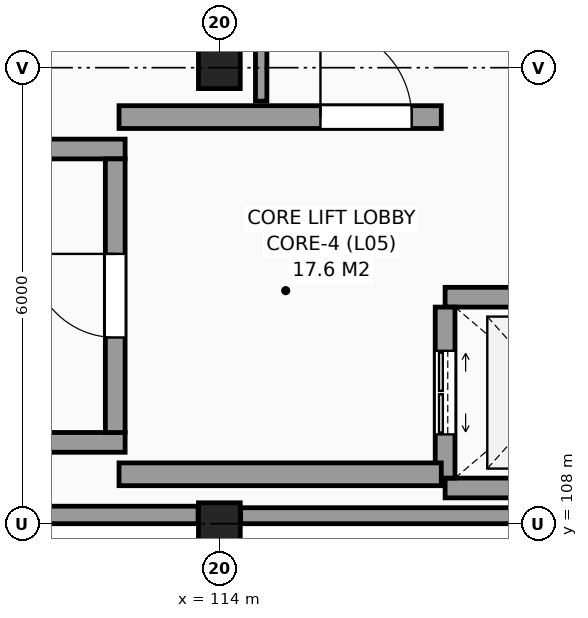
"""IFC4 building model, lengths in metres.
Left out: names, types, materials, properties, quantities, classifications, styles, units other than length and angle.
Written with IfcOpenShell. Run it as: python <this file> out.ifc"""

import sys

from ifc_helpers import new_model, si_unit, direction, frame, frame_2d, origin, origin_2d, place, context, subcontext, project, spatial, rectangle, extrude, element, fill, save


model = new_model("IFC4")
c1 = context("Model", 3, precision=1e-05, world=origin(), true_north=direction((0.0, 1.0)))
c2 = subcontext(c1, "Body", "Model", "MODEL_VIEW")
j1 = project(units=[si_unit("LENGTHUNIT", "METRE"), si_unit("PLANEANGLEUNIT", "RADIAN")], contexts=[c1])
p1 = place(None, origin())
s1 = spatial("IfcSite", under=j1, at=p1, CompositionType="ELEMENT")
p2 = place(p1, origin())
s2 = spatial("IfcBuilding", under=s1, at=p2, CompositionType="ELEMENT")
p3 = place(p2, frame((0.0, 0.0, 24.6)))
s3 = spatial("IfcBuildingStorey", under=s2, at=p3, CompositionType="ELEMENT", Elevation=24.6)
for number, where, z_axis, x_axis in (
    (1, (114.0, 108.0, 0.0), (0.0, 0.0, 1.0), (1.0, 0.0, 0.0)),
    (2, (114.0, 114.0, 0.0), (0.0, 0.0, 1.0), (1.0, 0.0, 0.0)),
):
    element("IfcColumn", number, at=place(p3, frame(where, z_axis=z_axis, x_axis=x_axis)), inside=s3, PredefinedType="COLUMN", context=c2, shape_type="SweptSolid", body=[
        extrude(rectangle(XDim=0.55, YDim=0.55, at=origin_2d()), origin(), (0.0, 0.0, 1.0), 3.6),
    ])
p4 = place(p3, frame((108.305, 108.115, 0.0), z_axis=(0.0, 0.0, 1.0), x_axis=(1.0, 0.0, 0.0)))
e3 = element("IfcWall", 3, at=p4, inside=s3, PredefinedType="SOLIDWALL", context=c2, shape_type="SweptSolid", body=[
    extrude(rectangle(XDim=5.415, YDim=0.23, at=frame_2d((2.708, 0.0))), origin(), (0.0, 0.0, 1.0), 2.73),
])
p5 = place(p3, frame((114.28, 108.105, 0.0), z_axis=(0.0, 0.0, 1.0), x_axis=(1.0, 0.0, 0.0)))
e4 = element("IfcWall", 4, at=p5, inside=s3, PredefinedType="SOLIDWALL", context=c2, shape_type="SweptSolid", body=[
    extrude(rectangle(XDim=5.415, YDim=0.21, at=frame_2d((2.708, 0.0))), origin(), (0.0, 0.0, 1.0), 2.73),
])
for number, where, z_axis, x_axis in (
    (5, (102.04, 109.07, 0.0), (0.0, 0.0, 1.0), (1.0, 0.0, 0.0)),
    (6, (102.04, 112.93, 0.0), (0.0, 0.0, 1.0), (1.0, 0.0, 0.0)),
):
    element("IfcWall", number, at=place(p3, frame(where, z_axis=z_axis, x_axis=x_axis)), inside=s3, PredefinedType="SHEAR", context=c2, shape_type="SweptSolid", body=[
        extrude(rectangle(XDim=10.72, YDim=0.26, at=frame_2d((5.36, 0.0))), origin(), (0.0, 0.0, 1.0), 3.6),
    ])
p6 = place(p3, frame((112.63, 109.2, 0.0), z_axis=(0.0, 0.0, 1.0), x_axis=(0.0, 1.0, 0.0)))
e7 = element("IfcWall", 7, at=p6, inside=s3, PredefinedType="SHEAR", context=c2, shape_type="SweptSolid", body=[
    extrude(rectangle(XDim=3.6, YDim=0.26, at=frame_2d((1.8, 0.0))), origin(), (0.0, 0.0, 1.0), 3.6),
])
p7 = place(p6, frame((1.25, 0.0, 0.0)))
e8 = element("IfcOpeningElement", 8, at=p7, cuts=e7, PredefinedType="OPENING", context=c2, shape_type="SweptSolid", body=[
    extrude(rectangle(XDim=1.1, YDim=2.15, at=frame_2d((0.55, 1.075))), frame((0.0, 0.14, 0.0), z_axis=(0.0, -1.0, 0.0), x_axis=(1.0, 0.0, 0.0)), (0.0, 0.0, 1.0), 0.28),
])
for number, where, z_axis, x_axis in (
    (9, (116.97, 108.47, 0.0), (0.0, 0.0, 1.0), (1.0, 0.0, 0.0)),
    (10, (116.97, 110.98, 0.0), (0.0, 0.0, 1.0), (1.0, 0.0, 0.0)),
):
    element("IfcWall", number, at=place(p3, frame(where, z_axis=z_axis, x_axis=x_axis)), inside=s3, PredefinedType="SHEAR", context=c2, shape_type="SweptSolid", body=[
        extrude(rectangle(XDim=2.91, YDim=0.26, at=frame_2d((1.455, 0.0))), origin(), (0.0, 0.0, 1.0), 3.6),
    ])
p8 = place(p3, frame((116.97, 108.6, 0.0), z_axis=(0.0, 0.0, 1.0), x_axis=(0.0, 1.0, 0.0)))
e11 = element("IfcWall", 11, at=p8, inside=s3, PredefinedType="SHEAR", context=c2, shape_type="SweptSolid", body=[
    extrude(rectangle(XDim=2.25, YDim=0.26, at=frame_2d((1.125, 0.0))), origin(), (0.0, 0.0, 1.0), 3.6),
])
p9 = place(p8, frame((0.575, 0.0, 0.0)))
e12 = element("IfcOpeningElement", 12, at=p9, cuts=e11, PredefinedType="OPENING", context=c2, shape_type="SweptSolid", body=[
    extrude(rectangle(XDim=1.1, YDim=2.2, at=frame_2d((0.55, 1.1))), frame((0.0, 0.14, 0.0), z_axis=(0.0, -1.0, 0.0), x_axis=(1.0, 0.0, 0.0)), (0.0, 0.0, 1.0), 0.28),
])
p10 = place(p3, frame((112.68, 113.35, 0.0), z_axis=(0.0, 0.0, 1.0), x_axis=(1.0, 0.0, 0.0)))
e13 = element("IfcWall", 13, at=p10, inside=s3, PredefinedType="SHEAR", context=c2, shape_type="SweptSolid", body=[
    extrude(rectangle(XDim=4.24, YDim=0.3, at=frame_2d((2.12, 0.0))), origin(), (0.0, 0.0, 1.0), 3.6),
])
p11 = place(p10, frame((2.65, 0.0, 0.0)))
e14 = element("IfcOpeningElement", 14, at=p11, cuts=e13, PredefinedType="OPENING", context=c2, shape_type="SweptSolid", body=[
    extrude(rectangle(XDim=1.2, YDim=2.2, at=frame_2d((0.6, 1.1))), frame((0.0, 0.16, 0.0), z_axis=(0.0, -1.0, 0.0), x_axis=(1.0, 0.0, 0.0)), (0.0, 0.0, 1.0), 0.32),
])
p12 = place(p3, frame((112.68, 108.65, 0.0), z_axis=(0.0, 0.0, 1.0), x_axis=(1.0, 0.0, 0.0)))
e15 = element("IfcWall", 15, at=p12, inside=s3, PredefinedType="SHEAR", context=c2, shape_type="SweptSolid", body=[
    extrude(rectangle(XDim=4.24, YDim=0.3, at=frame_2d((2.12, 0.0))), origin(), (0.0, 0.0, 1.0), 3.6),
])
p13 = place(p3, frame((114.55, 113.56, 0.0), z_axis=(0.0, 0.0, 1.0), x_axis=(0.0, 1.0, 0.0)))
e16 = element("IfcWall", 16, at=p13, inside=s3, PredefinedType="PARTITIONING", context=c2, shape_type="SweptSolid", body=[
    extrude(rectangle(XDim=2.24, YDim=0.15, at=frame_2d((1.12, 0.0))), origin(), (0.0, 0.0, 1.0), 3.38),
])
p14 = place(p7, origin())
e17 = element("IfcDoor", 17, at=p14, inside=s3, OperationType="SINGLE_SWING_RIGHT", PredefinedType="DOOR", context=c2, shape_type="SweptSolid", body=[
    extrude(rectangle(XDim=1.1, YDim=2.15, at=frame_2d((0.55, 1.075))), frame((0.0, 0.025, 0.0), z_axis=(0.0, -1.0, 0.0), x_axis=(1.0, 0.0, 0.0)), (0.0, 0.0, 1.0), 0.05),
])
fill(e8, e17)
p15 = place(p9, origin())
e18 = element("IfcDoor", 18, at=p15, inside=s3, OperationType="DOUBLE_DOOR_SLIDING", PredefinedType="DOOR", context=c2, shape_type="SweptSolid", body=[
    extrude(rectangle(XDim=1.1, YDim=2.2, at=frame_2d((0.55, 1.1))), frame((0.0, 0.025, 0.0), z_axis=(0.0, -1.0, 0.0), x_axis=(1.0, 0.0, 0.0)), (0.0, 0.0, 1.0), 0.05),
])
fill(e12, e18)
p16 = place(p11, origin())
e19 = element("IfcDoor", 19, at=p16, inside=s3, OperationType="SINGLE_SWING_LEFT", PredefinedType="DOOR", context=c2, shape_type="SweptSolid", body=[
    extrude(rectangle(XDim=1.2, YDim=2.2, at=frame_2d((0.6, 1.1))), frame((0.0, 0.025, 0.0), z_axis=(0.0, -1.0, 0.0), x_axis=(1.0, 0.0, 0.0)), (0.0, 0.0, 1.0), 0.05),
])
fill(e14, e19)
save(model, sys.argv[1])
